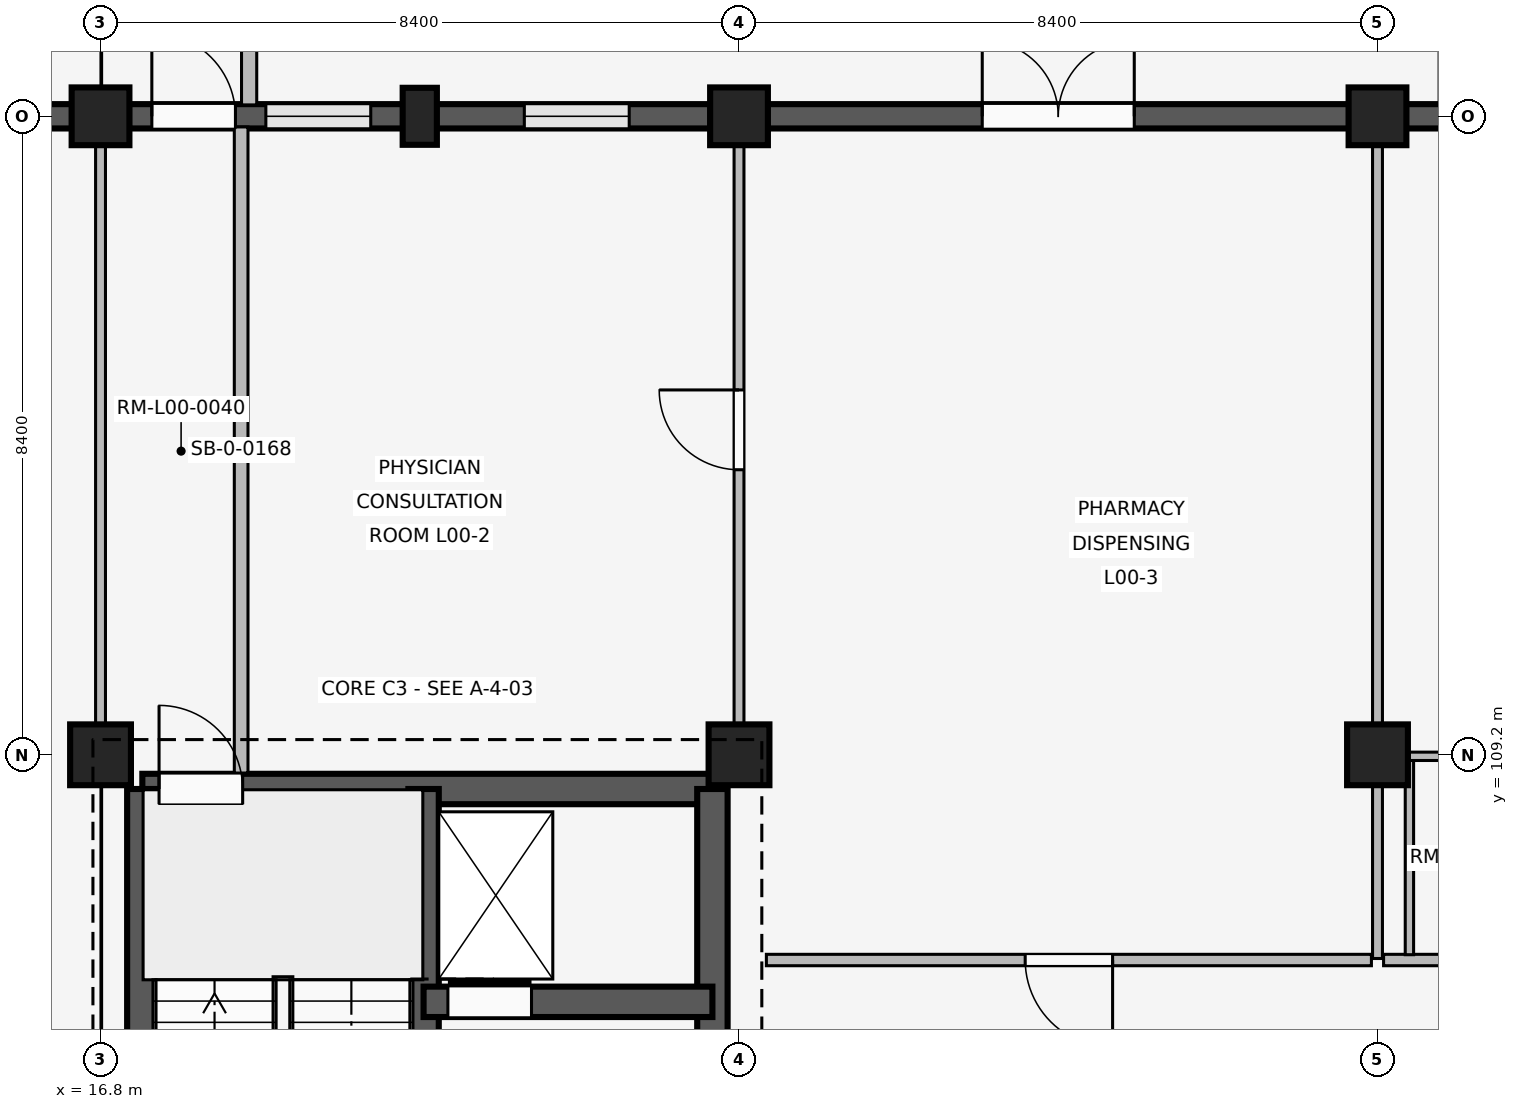
"""IFC4 building model, lengths in metres.
Left out: names, types, materials, properties, quantities, classifications, styles, units other than length and angle.
Written with IfcOpenShell. Run it as: python <this file> out.ifc"""

import sys

from ifc_helpers import new_model, si_unit, direction, frame, frame_2d, origin, origin_2d, place, context, subcontext, project, spatial, rectangle, extrude, element, fill, save


model = new_model("IFC4")
c1 = context("Model", 3, precision=1e-05, world=origin(), true_north=direction((0.0, 1.0)))
c2 = subcontext(c1, "Body", "Model", "MODEL_VIEW")
j1 = project(units=[si_unit("LENGTHUNIT", "METRE"), si_unit("PLANEANGLEUNIT", "RADIAN")], contexts=[c1])
p1 = place(None, origin())
s1 = spatial("IfcSite", under=j1, at=p1, CompositionType="ELEMENT")
p2 = place(p1, origin())
s2 = spatial("IfcBuilding", under=s1, at=p2, CompositionType="ELEMENT")
p3 = place(p2, origin())
s3 = spatial("IfcBuildingStorey", under=s2, at=p3, CompositionType="ELEMENT", Elevation=0.0)
p4 = place(p3, frame((16.8, 109.2, 0.0), z_axis=(0.0, 0.0, 1.0), x_axis=(1.0, 0.0, 0.0)))
e1 = element("IfcColumn", 1, at=p4, inside=s3, PredefinedType="COLUMN", context=c2, shape_type="SweptSolid", body=[
    extrude(rectangle(XDim=0.8, YDim=0.8, at=origin_2d()), origin(), (0.0, 0.0, 1.0), 4.8),
])
p5 = place(p3, frame((16.8, 117.6, 0.0), z_axis=(0.0, 0.0, 1.0), x_axis=(1.0, 0.0, 0.0)))
e2 = element("IfcColumn", 2, at=p5, inside=s3, PredefinedType="COLUMN", context=c2, shape_type="SweptSolid", body=[
    extrude(rectangle(XDim=0.76, YDim=0.76, at=origin_2d()), origin(), (0.0, 0.0, 1.0), 4.8),
])
p6 = place(p3, frame((25.2, 109.2, 0.0), z_axis=(0.0, 0.0, 1.0), x_axis=(1.0, 0.0, 0.0)))
e3 = element("IfcColumn", 3, at=p6, inside=s3, PredefinedType="COLUMN", context=c2, shape_type="SweptSolid", body=[
    extrude(rectangle(XDim=0.8, YDim=0.8, at=origin_2d()), origin(), (0.0, 0.0, 1.0), 4.8),
])
p7 = place(p3, frame((25.2, 117.6, 0.0), z_axis=(0.0, 0.0, 1.0), x_axis=(1.0, 0.0, 0.0)))
e4 = element("IfcColumn", 4, at=p7, inside=s3, PredefinedType="COLUMN", context=c2, shape_type="SweptSolid", body=[
    extrude(rectangle(XDim=0.76, YDim=0.76, at=origin_2d()), origin(), (0.0, 0.0, 1.0), 4.8),
])
p8 = place(p3, frame((33.6, 109.2, 0.0), z_axis=(0.0, 0.0, 1.0), x_axis=(1.0, 0.0, 0.0)))
e5 = element("IfcColumn", 5, at=p8, inside=s3, PredefinedType="COLUMN", context=c2, shape_type="SweptSolid", body=[
    extrude(rectangle(XDim=0.8, YDim=0.8, at=origin_2d()), origin(), (0.0, 0.0, 1.0), 4.8),
])
p9 = place(p3, frame((33.6, 117.6, 0.0), z_axis=(0.0, 0.0, 1.0), x_axis=(1.0, 0.0, 0.0)))
e6 = element("IfcColumn", 6, at=p9, inside=s3, PredefinedType="COLUMN", context=c2, shape_type="SweptSolid", body=[
    extrude(rectangle(XDim=0.76, YDim=0.76, at=origin_2d()), origin(), (0.0, 0.0, 1.0), 4.8),
])
p10 = place(p3, frame((21.0, 117.6, 0.0), z_axis=(0.0, 0.0, 1.0), x_axis=(1.0, 0.0, 0.0)))
e7 = element("IfcColumn", 7, at=p10, inside=s3, PredefinedType="PILASTER", context=c2, shape_type="SweptSolid", body=[
    extrude(rectangle(XDim=0.45, YDim=0.75, at=origin_2d()), origin(), (0.0, 0.0, 1.0), 4.8),
])
p11 = place(p3, frame((8.775, 117.6, 0.0), z_axis=(0.0, 0.0, 1.0), x_axis=(1.0, 0.0, 0.0)))
e8 = element("IfcWall", 8, at=p11, inside=s3, PredefinedType="SOLIDWALL", context=c2, shape_type="SweptSolid", body=[
    extrude(rectangle(XDim=7.65, YDim=0.32, at=frame_2d((3.825, 0.0))), origin(), (0.0, 0.0, 1.0), 3.82),
])
p12 = place(p11, frame((2.225, 0.0, 0.0)))
e9 = element("IfcOpeningElement", 9, at=p12, cuts=e8, PredefinedType="OPENING", context=c2, shape_type="SweptSolid", body=[
    extrude(rectangle(XDim=3.2, YDim=2.3, at=frame_2d((1.6, 1.15))), frame((0.0, 0.17, 0.0), z_axis=(0.0, -1.0, 0.0), x_axis=(1.0, 0.0, 0.0)), (0.0, 0.0, 1.0), 0.34),
])
p13 = place(p3, frame((17.175, 117.6, 0.0), z_axis=(0.0, 0.0, 1.0), x_axis=(1.0, 0.0, 0.0)))
e10 = element("IfcWall", 10, at=p13, inside=s3, PredefinedType="SOLIDWALL", context=c2, shape_type="SweptSolid", body=[
    extrude(rectangle(XDim=7.65, YDim=0.32, at=frame_2d((3.825, 0.0))), origin(), (0.0, 0.0, 1.0), 3.82),
])
p14 = place(p13, frame((0.3, 0.0, 0.0)))
e11 = element("IfcOpeningElement", 11, at=p14, cuts=e10, PredefinedType="OPENING", context=c2, shape_type="SweptSolid", body=[
    extrude(rectangle(XDim=1.1, YDim=2.15, at=frame_2d((0.55, 1.075))), frame((0.0, 0.17, 0.0), z_axis=(0.0, -1.0, 0.0), x_axis=(1.0, 0.0, 0.0)), (0.0, 0.0, 1.0), 0.34),
])
p15 = place(p13, frame((1.8, 0.0, 0.85)))
e12 = element("IfcOpeningElement", 12, at=p15, cuts=e10, PredefinedType="OPENING", context=c2, shape_type="SweptSolid", body=[
    extrude(rectangle(XDim=1.38, YDim=1.5, at=frame_2d((0.69, 0.75))), frame((0.0, 0.17, 0.0), z_axis=(0.0, -1.0, 0.0), x_axis=(1.0, 0.0, 0.0)), (0.0, 0.0, 1.0), 0.34),
])
p16 = place(p13, frame((5.2, 0.0, 0.85)))
e13 = element("IfcOpeningElement", 13, at=p16, cuts=e10, PredefinedType="OPENING", context=c2, shape_type="SweptSolid", body=[
    extrude(rectangle(XDim=1.38, YDim=1.5, at=frame_2d((0.69, 0.75))), frame((0.0, 0.17, 0.0), z_axis=(0.0, -1.0, 0.0), x_axis=(1.0, 0.0, 0.0)), (0.0, 0.0, 1.0), 0.34),
])
p17 = place(p3, frame((18.755, 117.75, 0.0), z_axis=(0.0, 0.0, 1.0), x_axis=(0.0, 1.0, 0.0)))
e14 = element("IfcWall", 14, at=p17, inside=s3, PredefinedType="ELEMENTEDWALL", context=c2, shape_type="SweptSolid", body=[
    extrude(rectangle(XDim=0.85, YDim=0.2, at=frame_2d((0.425, 0.0))), origin(), (0.0, 0.0, 1.0), 3.8),
])
p18 = place(p3, frame((25.575, 117.6, 0.0), z_axis=(0.0, 0.0, 1.0), x_axis=(1.0, 0.0, 0.0)))
e15 = element("IfcWall", 15, at=p18, inside=s3, PredefinedType="SOLIDWALL", context=c2, shape_type="SweptSolid", body=[
    extrude(rectangle(XDim=7.65, YDim=0.32, at=frame_2d((3.825, 0.0))), origin(), (0.0, 0.0, 1.0), 3.82),
])
p19 = place(p18, frame((2.825, 0.0, 0.0)))
e16 = element("IfcOpeningElement", 16, at=p19, cuts=e15, PredefinedType="OPENING", context=c2, shape_type="SweptSolid", body=[
    extrude(rectangle(XDim=2.0, YDim=2.4, at=frame_2d((1.0, 1.2))), frame((0.0, 0.17, 0.0), z_axis=(0.0, -1.0, 0.0), x_axis=(1.0, 0.0, 0.0)), (0.0, 0.0, 1.0), 0.34),
])
p20 = place(p3, frame((33.975, 117.6, 0.0), z_axis=(0.0, 0.0, 1.0), x_axis=(1.0, 0.0, 0.0)))
e17 = element("IfcWall", 17, at=p20, inside=s3, PredefinedType="SOLIDWALL", context=c2, shape_type="SweptSolid", body=[
    extrude(rectangle(XDim=7.65, YDim=0.32, at=frame_2d((3.825, 0.0))), origin(), (0.0, 0.0, 1.0), 3.82),
])
p21 = place(p20, frame((0.949, 0.0, 0.85)))
e18 = element("IfcOpeningElement", 18, at=p21, cuts=e17, PredefinedType="OPENING", context=c2, shape_type="SweptSolid", body=[
    extrude(rectangle(XDim=1.62, YDim=1.8, at=frame_2d((0.81, 0.9))), frame((0.0, 0.17, 0.0), z_axis=(0.0, -1.0, 0.0), x_axis=(1.0, 0.0, 0.0)), (0.0, 0.0, 1.0), 0.34),
])
p22 = place(p20, frame((5.081, 0.0, 0.85)))
e19 = element("IfcOpeningElement", 19, at=p22, cuts=e17, PredefinedType="OPENING", context=c2, shape_type="SweptSolid", body=[
    extrude(rectangle(XDim=1.62, YDim=1.8, at=frame_2d((0.81, 0.9))), frame((0.0, 0.17, 0.0), z_axis=(0.0, -1.0, 0.0), x_axis=(1.0, 0.0, 0.0)), (0.0, 0.0, 1.0), 0.34),
])
p23 = place(p3, frame((17.35, 108.75, 0.0), z_axis=(0.0, 0.0, 1.0), x_axis=(1.0, 0.0, 0.0)))
e20 = element("IfcWall", 20, at=p23, inside=s3, PredefinedType="SHEAR", context=c2, shape_type="SweptSolid", body=[
    extrude(rectangle(XDim=7.5, YDim=0.4, at=frame_2d((3.75, 0.0))), origin(), (0.0, 0.0, 1.0), 4.52),
])
p24 = place(p23, frame((0.22, 0.0, 0.0)))
e21 = element("IfcOpeningElement", 21, at=p24, cuts=e20, PredefinedType="OPENING", context=c2, shape_type="SweptSolid", body=[
    extrude(rectangle(XDim=1.1, YDim=2.1, at=frame_2d((0.55, 1.05))), frame((0.0, 0.21, 0.0), z_axis=(0.0, -1.0, 0.0), x_axis=(1.0, 0.0, 0.0)), (0.0, 0.0, 1.0), 0.42),
])
p25 = place(p3, frame((17.35, 101.2, 0.0), z_axis=(0.0, 0.0, 1.0), x_axis=(0.0, 1.0, 0.0)))
e22 = element("IfcWall", 22, at=p25, inside=s3, PredefinedType="SHEAR", context=c2, shape_type="SweptSolid", body=[
    extrude(rectangle(XDim=7.55, YDim=0.4, at=frame_2d((3.775, 0.0))), origin(), (0.0, 0.0, 1.0), 4.52),
])
p26 = place(p25, frame((0.28, 0.0, 0.0)))
e23 = element("IfcOpeningElement", 23, at=p26, cuts=e22, PredefinedType="OPENING", context=c2, shape_type="SweptSolid", body=[
    extrude(rectangle(XDim=1.0, YDim=2.15, at=frame_2d((0.5, 1.075))), frame((0.0, 0.21, 0.0), z_axis=(0.0, -1.0, 0.0), x_axis=(1.0, 0.0, 0.0)), (0.0, 0.0, 1.0), 0.42),
])
p27 = place(p3, frame((24.85, 101.2, 0.0), z_axis=(0.0, 0.0, 1.0), x_axis=(0.0, 1.0, 0.0)))
e24 = element("IfcWall", 24, at=p27, inside=s3, PredefinedType="SHEAR", context=c2, shape_type="SweptSolid", body=[
    extrude(rectangle(XDim=7.55, YDim=0.4, at=frame_2d((3.775, 0.0))), origin(), (0.0, 0.0, 1.0), 4.52),
])
p28 = place(p27, frame((2.4, 0.0, 0.0)))
e25 = element("IfcOpeningElement", 25, at=p28, cuts=e24, PredefinedType="OPENING", context=c2, shape_type="SweptSolid", body=[
    extrude(rectangle(XDim=1.2, YDim=2.2, at=frame_2d((0.6, 1.1))), frame((0.0, 0.21, 0.0), z_axis=(0.0, -1.0, 0.0), x_axis=(1.0, 0.0, 0.0)), (0.0, 0.0, 1.0), 0.42),
])
p29 = place(p3, frame((21.05, 101.2, 0.0), z_axis=(0.0, 0.0, 1.0), x_axis=(0.0, 1.0, 0.0)))
e26 = element("IfcWall", 26, at=p29, inside=s3, PredefinedType="SHEAR", context=c2, shape_type="SweptSolid", body=[
    extrude(rectangle(XDim=7.55, YDim=0.4, at=frame_2d((3.775, 0.0))), origin(), (0.0, 0.0, 1.0), 4.52),
])
p30 = place(p29, frame((0.28, 0.0, 0.0)))
e27 = element("IfcOpeningElement", 27, at=p30, cuts=e26, PredefinedType="OPENING", context=c2, shape_type="SweptSolid", body=[
    extrude(rectangle(XDim=1.0, YDim=2.15, at=frame_2d((0.5, 1.075))), frame((0.0, 0.21, 0.0), z_axis=(0.0, -1.0, 0.0), x_axis=(1.0, 0.0, 0.0)), (0.0, 0.0, 1.0), 0.42),
])
p31 = place(p3, frame((21.05, 105.95, 0.0), z_axis=(0.0, 0.0, 1.0), x_axis=(1.0, 0.0, 0.0)))
e28 = element("IfcWall", 28, at=p31, inside=s3, PredefinedType="SHEAR", context=c2, shape_type="SweptSolid", body=[
    extrude(rectangle(XDim=3.8, YDim=0.4, at=frame_2d((1.9, 0.0))), origin(), (0.0, 0.0, 1.0), 4.52),
])
p32 = place(p31, frame((0.32, 0.0, 0.0)))
e29 = element("IfcOpeningElement", 29, at=p32, cuts=e28, PredefinedType="OPENING", context=c2, shape_type="SweptSolid", body=[
    extrude(rectangle(XDim=1.1, YDim=2.15, at=frame_2d((0.55, 1.075))), frame((0.0, 0.21, 0.0), z_axis=(0.0, -1.0, 0.0), x_axis=(1.0, 0.0, 0.0)), (0.0, 0.0, 1.0), 0.42),
])
p33 = place(p3, frame((16.8, 109.55, 0.0), z_axis=(0.0, 0.0, 1.0), x_axis=(0.0, 1.0, 0.0)))
e30 = element("IfcWall", 30, at=p33, inside=s3, PredefinedType="PARTITIONING", context=c2, shape_type="SweptSolid", body=[
    extrude(rectangle(XDim=7.91, YDim=0.13, at=frame_2d((3.955, 0.0))), origin(), (0.0, 0.0, 1.0), 3.8),
])
p34 = place(p3, frame((18.65, 108.96, 0.0), z_axis=(0.0, 0.0, 1.0), x_axis=(0.0, 1.0, 0.0)))
e31 = element("IfcWall", 31, at=p34, inside=s3, PredefinedType="PARTITIONING", context=c2, shape_type="SweptSolid", body=[
    extrude(rectangle(XDim=8.5, YDim=0.18, at=frame_2d((4.25, 0.0))), origin(), (0.0, 0.0, 1.0), 3.8),
])
p35 = place(p3, frame((25.2, 109.55, 0.0), z_axis=(0.0, 0.0, 1.0), x_axis=(0.0, 1.0, 0.0)))
e32 = element("IfcWall", 32, at=p35, inside=s3, PredefinedType="PARTITIONING", context=c2, shape_type="SweptSolid", body=[
    extrude(rectangle(XDim=7.91, YDim=0.13, at=frame_2d((3.955, 0.0))), origin(), (0.0, 0.0, 1.0), 3.8),
])
p36 = place(p35, frame((3.4, 0.0, 0.0)))
e33 = element("IfcOpeningElement", 33, at=p36, cuts=e32, PredefinedType="OPENING", context=c2, shape_type="SweptSolid", body=[
    extrude(rectangle(XDim=1.05, YDim=2.2, at=frame_2d((0.525, 1.1))), frame((0.0, 0.075, 0.0), z_axis=(0.0, -1.0, 0.0), x_axis=(1.0, 0.0, 0.0)), (0.0, 0.0, 1.0), 0.15),
])
p37 = place(p3, frame((33.52, 106.5, 0.0), z_axis=(0.0, 0.0, 1.0), x_axis=(-1.0, 0.0, 0.0)))
e34 = element("IfcWall", 34, at=p37, inside=s3, PredefinedType="PARTITIONING", context=c2, shape_type="SweptSolid", body=[
    extrude(rectangle(XDim=7.96, YDim=0.15, at=frame_2d((3.98, 0.0))), origin(), (0.0, 0.0, 1.0), 3.8),
])
p38 = place(p37, frame((3.405, 0.0, 0.0)))
e35 = element("IfcOpeningElement", 35, at=p38, cuts=e34, PredefinedType="OPENING", context=c2, shape_type="SweptSolid", body=[
    extrude(rectangle(XDim=1.15, YDim=2.2, at=frame_2d((0.575, 1.1))), frame((0.0, 0.085, 0.0), z_axis=(0.0, -1.0, 0.0), x_axis=(1.0, 0.0, 0.0)), (0.0, 0.0, 1.0), 0.17),
])
p39 = place(p3, frame((33.6, 106.52, 0.0), z_axis=(0.0, 0.0, 1.0), x_axis=(0.0, 1.0, 0.0)))
e36 = element("IfcWall", 36, at=p39, inside=s3, PredefinedType="PARTITIONING", context=c2, shape_type="SweptSolid", body=[
    extrude(rectangle(XDim=10.94, YDim=0.13, at=frame_2d((5.47, 0.0))), origin(), (0.0, 0.0, 1.0), 3.8),
])
p40 = place(p3, frame((41.64, 106.5, 0.0), z_axis=(0.0, 0.0, 1.0), x_axis=(-1.0, 0.0, 0.0)))
e37 = element("IfcWall", 37, at=p40, inside=s3, PredefinedType="PARTITIONING", context=c2, shape_type="SweptSolid", body=[
    extrude(rectangle(XDim=7.96, YDim=0.15, at=frame_2d((3.98, 0.0))), origin(), (0.0, 0.0, 1.0), 3.8),
])
p41 = place(p40, frame((0.45, 0.0, 0.0)))
e38 = element("IfcOpeningElement", 38, at=p41, cuts=e37, PredefinedType="OPENING", context=c2, shape_type="SweptSolid", body=[
    extrude(rectangle(XDim=1.05, YDim=2.2, at=frame_2d((0.525, 1.1))), frame((0.0, 0.085, 0.0), z_axis=(0.0, -1.0, 0.0), x_axis=(1.0, 0.0, 0.0)), (0.0, 0.0, 1.0), 0.17),
])
p42 = place(p40, frame((4.15, 0.0, 0.0)))
e39 = element("IfcOpeningElement", 39, at=p42, cuts=e37, PredefinedType="OPENING", context=c2, shape_type="SweptSolid", body=[
    extrude(rectangle(XDim=1.05, YDim=2.2, at=frame_2d((0.525, 1.1))), frame((0.0, 0.085, 0.0), z_axis=(0.0, -1.0, 0.0), x_axis=(1.0, 0.0, 0.0)), (0.0, 0.0, 1.0), 0.17),
])
p43 = place(p3, frame((34.02, 106.57, 0.0), z_axis=(0.0, 0.0, 1.0), x_axis=(0.0, 1.0, 0.0)))
e40 = element("IfcWall", 40, at=p43, inside=s3, PredefinedType="PARTITIONING", context=c2, shape_type="SweptSolid", body=[
    extrude(rectangle(XDim=2.61, YDim=0.11, at=frame_2d((1.305, 0.0))), origin(), (0.0, 0.0, 1.0), 3.8),
])
p44 = place(p3, frame((34.02, 109.18, 0.0), z_axis=(0.0, 0.0, 1.0), x_axis=(1.0, 0.0, 0.0)))
e41 = element("IfcWall", 41, at=p44, inside=s3, PredefinedType="PARTITIONING", context=c2, shape_type="SweptSolid", body=[
    extrude(rectangle(XDim=1.98, YDim=0.11, at=frame_2d((0.99, 0.0))), origin(), (0.0, 0.0, 1.0), 3.8),
])
p45 = place(p44, frame((0.54, 0.0, 0.0)))
e42 = element("IfcOpeningElement", 42, at=p45, cuts=e41, PredefinedType="OPENING", context=c2, shape_type="SweptSolid", body=[
    extrude(rectangle(XDim=0.9, YDim=2.1, at=frame_2d((0.45, 1.05))), frame((0.0, 0.065, 0.0), z_axis=(0.0, -1.0, 0.0), x_axis=(1.0, 0.0, 0.0)), (0.0, 0.0, 1.0), 0.13),
])
p46 = place(p14, origin())
e43 = element("IfcDoor", 43, at=p46, inside=s3, OperationType="SINGLE_SWING_LEFT", PredefinedType="DOOR", context=c2, shape_type="SweptSolid", body=[
    extrude(rectangle(XDim=1.1, YDim=2.15, at=frame_2d((0.55, 1.075))), frame((0.0, 0.025, 0.0), z_axis=(0.0, -1.0, 0.0), x_axis=(1.0, 0.0, 0.0)), (0.0, 0.0, 1.0), 0.05),
])
fill(e11, e43)
p47 = place(p15, origin())
e44 = element("IfcWindow", 44, at=p47, inside=s3, PartitioningType="SINGLE_PANEL", PredefinedType="WINDOW", context=c2, shape_type="SweptSolid", body=[
    extrude(rectangle(XDim=1.38, YDim=1.5, at=frame_2d((0.69, 0.75))), frame((0.0, 0.03, 0.0), z_axis=(0.0, -1.0, 0.0), x_axis=(1.0, 0.0, 0.0)), (0.0, 0.0, 1.0), 0.06),
])
fill(e12, e44)
p48 = place(p16, origin())
e45 = element("IfcWindow", 45, at=p48, inside=s3, PartitioningType="SINGLE_PANEL", PredefinedType="WINDOW", context=c2, shape_type="SweptSolid", body=[
    extrude(rectangle(XDim=1.38, YDim=1.5, at=frame_2d((0.69, 0.75))), frame((0.0, 0.03, 0.0), z_axis=(0.0, -1.0, 0.0), x_axis=(1.0, 0.0, 0.0)), (0.0, 0.0, 1.0), 0.06),
])
fill(e13, e45)
p49 = place(p19, origin())
e46 = element("IfcDoor", 46, at=p49, inside=s3, OperationType="DOUBLE_SWING_LEFT", PredefinedType="DOOR", context=c2, shape_type="SweptSolid", body=[
    extrude(rectangle(XDim=2.0, YDim=2.4, at=frame_2d((1.0, 1.2))), frame((0.0, 0.025, 0.0), z_axis=(0.0, -1.0, 0.0), x_axis=(1.0, 0.0, 0.0)), (0.0, 0.0, 1.0), 0.05),
])
fill(e16, e46)
p50 = place(p24, origin())
e47 = element("IfcDoor", 47, at=p50, inside=s3, OperationType="SINGLE_SWING_LEFT", PredefinedType="DOOR", context=c2, shape_type="SweptSolid", body=[
    extrude(rectangle(XDim=1.1, YDim=2.1, at=frame_2d((0.55, 1.05))), frame((0.0, 0.025, 0.0), z_axis=(0.0, -1.0, 0.0), x_axis=(1.0, 0.0, 0.0)), (0.0, 0.0, 1.0), 0.05),
])
fill(e21, e47)
p51 = place(p32, origin())
e48 = element("IfcDoor", 48, at=p51, inside=s3, OperationType="SLIDING_TO_LEFT", PredefinedType="DOOR", context=c2, shape_type="SweptSolid", body=[
    extrude(rectangle(XDim=1.1, YDim=2.15, at=frame_2d((0.55, 1.075))), frame((0.0, 0.025, 0.0), z_axis=(0.0, -1.0, 0.0), x_axis=(1.0, 0.0, 0.0)), (0.0, 0.0, 1.0), 0.05),
])
fill(e29, e48)
p52 = place(p36, origin())
e49 = element("IfcDoor", 49, at=p52, inside=s3, OperationType="SINGLE_SWING_RIGHT", PredefinedType="DOOR", context=c2, shape_type="SweptSolid", body=[
    extrude(rectangle(XDim=1.05, YDim=2.2, at=frame_2d((0.525, 1.1))), frame((0.0, 0.025, 0.0), z_axis=(0.0, -1.0, 0.0), x_axis=(1.0, 0.0, 0.0)), (0.0, 0.0, 1.0), 0.05),
])
fill(e33, e49)
p53 = place(p38, origin())
e50 = element("IfcDoor", 50, at=p53, inside=s3, OperationType="SINGLE_SWING_LEFT", PredefinedType="DOOR", context=c2, shape_type="SweptSolid", body=[
    extrude(rectangle(XDim=1.15, YDim=2.2, at=frame_2d((0.575, 1.1))), frame((0.0, 0.025, 0.0), z_axis=(0.0, -1.0, 0.0), x_axis=(1.0, 0.0, 0.0)), (0.0, 0.0, 1.0), 0.05),
])
fill(e35, e50)
save(model, sys.argv[1])
